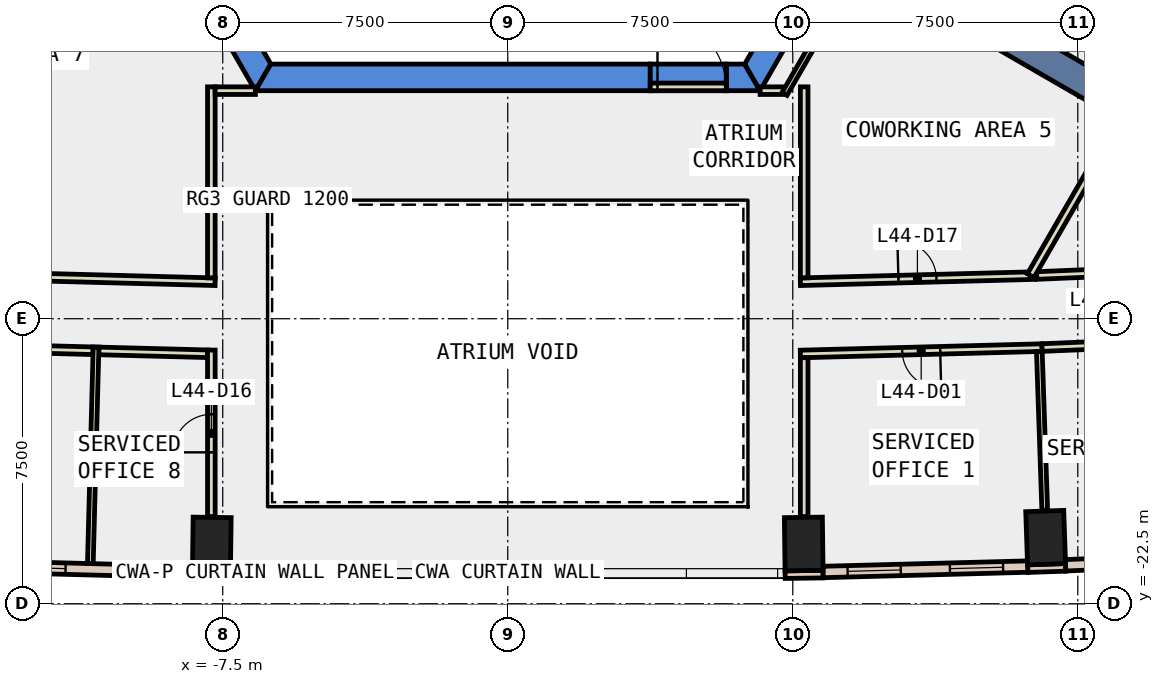
"""IFC4 building model, lengths in metres.
Left out: names, types, materials, properties, quantities, classifications, styles, units other than length and angle.
Written with IfcOpenShell. Run it as: python <this file> out.ifc"""

import sys

from ifc_helpers import new_model, si_unit, direction, frame, frame_2d, origin, origin_2d, place, context, subcontext, project, spatial, polyline, rectangle, outline, extrude, element, fill, save


model = new_model("IFC4")
c1 = context("Model", 3, precision=1e-05, world=origin(), true_north=direction((0.0, 1.0)))
c2 = subcontext(c1, "Body", "Model", "MODEL_VIEW")
j1 = project(units=[si_unit("LENGTHUNIT", "METRE"), si_unit("PLANEANGLEUNIT", "RADIAN")], contexts=[c1])
p1 = place(None, origin())
s1 = spatial("IfcSite", under=j1, at=p1, CompositionType="ELEMENT")
p2 = place(p1, origin())
s2 = spatial("IfcBuilding", under=s1, at=p2, CompositionType="ELEMENT")
p3 = place(p2, frame((0.0, 0.0, 198.2)))
s3 = spatial("IfcBuildingStorey", under=s2, at=p3, CompositionType="ELEMENT", Elevation=198.2)
for number, where, z_axis, x_axis in (
    (1, (-7.788, -20.927, -0.4), (0.0, 0.0, 1.0), (-1.0, 0.013, 0.0)),
    (2, (7.788, -20.927, -0.4), (0.0, 0.0, 1.0), (1.0, 0.013, 0.0)),
    (3, (14.154, -20.76, -0.4), (0.0, 0.0, 1.0), (0.999, 0.034, 0.0)),
):
    element("IfcColumn", number, at=place(p3, frame(where, z_axis=z_axis, x_axis=x_axis)), inside=s3, PredefinedType="COLUMN", context=c2, shape_type="SweptSolid", body=[
        extrude(rectangle(XDim=1.0, YDim=1.4, at=origin_2d()), origin(), (0.0, 0.0, 1.0), 4.2),
    ])
p4 = place(p3, frame((0.0, 0.0, -0.4)))
e4 = element("IfcWall", 4, at=p4, inside=s3, PredefinedType="SHEAR", context=c2, shape_type="SweptSolid", body=[
    extrude(outline(polyline([(-13.279, 2.5), (-6.64, -9.0), (-6.235, -8.3), (-12.471, 2.5), (-13.279, 2.5)])), origin(), (0.0, 0.0, 1.0), 4.2),
])
p5 = place(p3, frame((0.0, 0.0, -0.4)))
e5 = element("IfcWall", 5, at=p5, inside=s3, PredefinedType="SHEAR", context=c2, shape_type="SweptSolid", body=[
    extrude(outline(polyline([(3.75, -9.0), (3.75, -8.3), (-6.235, -8.3), (-6.64, -9.0), (3.75, -9.0)])), origin(), (0.0, 0.0, 1.0), 4.2),
])
p6 = place(p3, frame((0.0, 0.0, -0.4)))
e6 = element("IfcWall", 6, at=p6, inside=s3, PredefinedType="SHEAR", context=c2, shape_type="SweptSolid", body=[
    extrude(outline(polyline([(5.75, -8.3), (5.75, -9.0), (6.64, -9.0), (6.235, -8.3), (5.75, -8.3)])), origin(), (0.0, 0.0, 1.0), 4.2),
])
p7 = place(p3, frame((0.0, 0.0, 3.6)))
e7 = element("IfcWall", 7, at=p7, inside=s3, PredefinedType="SHEAR", context=c2, shape_type="SweptSolid", body=[
    extrude(outline(polyline([(5.75, -9.0), (5.75, -8.3), (3.75, -8.3), (3.75, -9.0), (5.75, -9.0)])), origin(), (0.0, 0.0, 1.0), 0.2),
])
p8 = place(p3, frame((0.0, 0.0, -0.4)))
e8 = element("IfcWall", 8, at=p8, inside=s3, PredefinedType="SHEAR", context=c2, shape_type="SweptSolid", body=[
    extrude(outline(polyline([(6.64, -9.0), (13.279, 2.5), (12.471, 2.5), (6.235, -8.3), (6.64, -9.0)])), origin(), (0.0, 0.0, 1.0), 4.2),
])
for number, where, z_axis, x_axis in (
    (9, (8.877, -5.125, -0.4), (0.0, 0.0, 1.0), (0.866, -0.5, 0.0)),
    (10, (-8.877, -5.125, -0.4), (0.0, 0.0, 1.0), (-0.866, -0.5, 0.0)),
):
    element("IfcWall", number, at=place(p3, frame(where, z_axis=z_axis, x_axis=x_axis)), inside=s3, PredefinedType="SHEAR", context=c2, shape_type="SweptSolid", body=[
        extrude(rectangle(XDim=9.0, YDim=0.8, at=frame_2d((4.5, 0.0))), origin(), (0.0, 0.0, 1.0), 4.2),
    ])
for number, where, z_axis, x_axis in (
    (11, (-8.299, -21.72, 0.0), (0.0, 0.0, 1.0), (1.0, -0.014, 0.0)),
    (12, (7.299, -21.734, 0.0), (0.0, 0.0, 1.0), (1.0, 0.014, 0.0)),
):
    element("IfcWall", number, at=place(p3, frame(where, z_axis=z_axis, x_axis=x_axis)), inside=s3, PredefinedType="STANDARD", context=c2, shape_type="SweptSolid", body=[
        extrude(rectangle(XDim=1.0, YDim=0.2, at=frame_2d((0.5, 0.0))), origin(), (0.0, 0.0, 1.0), 3.8),
    ])
p9 = place(p3, frame((13.682, -21.576, 0.0), z_axis=(0.0, 0.0, 1.0), x_axis=(0.999423561854, 0.033949138587, 0.0)))
e13 = element("IfcWall", 13, at=p9, inside=s3, PredefinedType="STANDARD", context=c2, shape_type="SweptSolid", body=[
    extrude(rectangle(XDim=1.0, YDim=0.2, at=frame_2d((0.5, 0.0))), origin(), (0.0, 0.0, 1.0), 3.8),
])
p10 = place(p3, frame((-13.681, -21.522, 0.0), z_axis=(0.0, 0.0, 1.0), x_axis=(0.999651908676, -0.026382977093, 0.0)))
e14 = element("IfcWall", 14, at=p10, inside=s3, PredefinedType="STANDARD", context=c2, shape_type="SweptSolid", body=[
    extrude(rectangle(XDim=5.386, YDim=0.3, at=frame_2d((2.693, 0.0))), origin(), (0.0, 0.0, 1.0), 3.8),
])
p11 = place(p10, frame((0.646, 0.0, 0.9)))
e15 = element("IfcOpeningElement", 15, at=p11, cuts=e14, PredefinedType="OPENING", context=c2, shape_type="SweptSolid", body=[
    extrude(rectangle(XDim=1.4, YDim=2.6, at=frame_2d((0.7, 1.3))), frame((0.0, 0.16, 0.0), z_axis=(0.0, -1.0, 0.0), x_axis=(1.0, 0.0, 0.0)), (0.0, 0.0, 1.0), 0.32),
])
p12 = place(p10, frame((3.339, 0.0, 0.9)))
e16 = element("IfcOpeningElement", 16, at=p12, cuts=e14, PredefinedType="OPENING", context=c2, shape_type="SweptSolid", body=[
    extrude(rectangle(XDim=1.4, YDim=2.6, at=frame_2d((0.7, 1.3))), frame((0.0, 0.16, 0.0), z_axis=(0.0, -1.0, 0.0), x_axis=(1.0, 0.0, 0.0)), (0.0, 0.0, 1.0), 0.32),
])
p13 = place(p3, frame((8.297, -21.664, 0.0), z_axis=(0.0, 0.0, 1.0), x_axis=(0.999651908676, 0.026382977093, 0.0)))
e17 = element("IfcWall", 17, at=p13, inside=s3, PredefinedType="STANDARD", context=c2, shape_type="SweptSolid", body=[
    extrude(rectangle(XDim=5.386, YDim=0.3, at=frame_2d((2.693, 0.0))), origin(), (0.0, 0.0, 1.0), 3.8),
])
p14 = place(p13, frame((0.646, 0.0, 0.9)))
e18 = element("IfcOpeningElement", 18, at=p14, cuts=e17, PredefinedType="OPENING", context=c2, shape_type="SweptSolid", body=[
    extrude(rectangle(XDim=1.4, YDim=2.6, at=frame_2d((0.7, 1.3))), frame((0.0, 0.16, 0.0), z_axis=(0.0, -1.0, 0.0), x_axis=(1.0, 0.0, 0.0)), (0.0, 0.0, 1.0), 0.32),
])
p15 = place(p13, frame((3.339, 0.0, 0.9)))
e19 = element("IfcOpeningElement", 19, at=p15, cuts=e17, PredefinedType="OPENING", context=c2, shape_type="SweptSolid", body=[
    extrude(rectangle(XDim=1.4, YDim=2.6, at=frame_2d((0.7, 1.3))), frame((0.0, 0.16, 0.0), z_axis=(0.0, -1.0, 0.0), x_axis=(1.0, 0.0, 0.0)), (0.0, 0.0, 1.0), 0.32),
])
p16 = place(p3, frame((14.678, -21.488, 0.0), z_axis=(0.0, 0.0, 1.0), x_axis=(0.999127941775, 0.041753514387, 0.0)))
e20 = element("IfcWall", 20, at=p16, inside=s3, PredefinedType="STANDARD", context=c2, shape_type="SweptSolid", body=[
    extrude(rectangle(XDim=5.368, YDim=0.3, at=frame_2d((2.684, 0.0))), origin(), (0.0, 0.0, 1.0), 3.8),
])
p17 = place(p16, frame((0.642, 0.0, 0.9)))
e21 = element("IfcOpeningElement", 21, at=p17, cuts=e20, PredefinedType="OPENING", context=c2, shape_type="SweptSolid", body=[
    extrude(rectangle(XDim=1.4, YDim=2.6, at=frame_2d((0.7, 1.3))), frame((0.0, 0.16, 0.0), z_axis=(0.0, -1.0, 0.0), x_axis=(1.0, 0.0, 0.0)), (0.0, 0.0, 1.0), 0.32),
])
p18 = place(p16, frame((3.326, 0.0, 0.9)))
e22 = element("IfcOpeningElement", 22, at=p18, cuts=e20, PredefinedType="OPENING", context=c2, shape_type="SweptSolid", body=[
    extrude(rectangle(XDim=1.4, YDim=2.6, at=frame_2d((0.7, 1.3))), frame((0.0, 0.16, 0.0), z_axis=(0.0, -1.0, 0.0), x_axis=(1.0, 0.0, 0.0)), (0.0, 0.0, 1.0), 0.32),
])
p19 = place(p3, frame((7.7, -14.027, 0.0), z_axis=(0.0, 0.0, 1.0), x_axis=(0.999653919353, 0.026306682088, 0.0)))
e23 = element("IfcWall", 23, at=p19, inside=s3, PredefinedType="PARTITIONING", context=c2, shape_type="SweptSolid", body=[
    extrude(rectangle(XDim=6.162, YDim=0.2, at=frame_2d((3.081, 0.0))), origin(), (0.0, 0.0, 1.0), 3.8),
])
p20 = place(p19, frame((2.581, 0.0, 0.0)))
e24 = element("IfcOpeningElement", 24, at=p20, cuts=e23, PredefinedType="OPENING", context=c2, shape_type="SweptSolid", body=[
    extrude(rectangle(XDim=1.0, YDim=2.1, at=frame_2d((0.5, 1.05))), frame((0.0, 0.11, 0.0), z_axis=(0.0, -1.0, 0.0), x_axis=(1.0, 0.0, 0.0)), (0.0, 0.0, 1.0), 0.22),
])
p21 = place(p3, frame((13.919, -13.863, 0.0), z_axis=(0.0, 0.0, 1.0), x_axis=(0.999130261307, 0.041697972867, 0.0)))
e25 = element("IfcWall", 25, at=p21, inside=s3, PredefinedType="PARTITIONING", context=c2, shape_type="SweptSolid", body=[
    extrude(rectangle(XDim=5.422, YDim=0.2, at=frame_2d((2.711, 0.0))), origin(), (0.0, 0.0, 1.0), 3.8),
])
p22 = place(p21, frame((2.211, 0.0, 0.0)))
e26 = element("IfcOpeningElement", 26, at=p22, cuts=e25, PredefinedType="OPENING", context=c2, shape_type="SweptSolid", body=[
    extrude(rectangle(XDim=1.0, YDim=2.1, at=frame_2d((0.5, 1.05))), frame((0.0, 0.11, 0.0), z_axis=(0.0, -1.0, 0.0), x_axis=(1.0, 0.0, 0.0)), (0.0, 0.0, 1.0), 0.22),
])
p23 = place(p3, frame((-13.919, -13.863, 0.0), z_axis=(0.0, 0.0, 1.0), x_axis=(0.999652206272, -0.026371698764, 0.0)))
e27 = element("IfcWall", 27, at=p23, inside=s3, PredefinedType="PARTITIONING", context=c2, shape_type="SweptSolid", body=[
    extrude(rectangle(XDim=6.221, YDim=0.2, at=frame_2d((3.111, 0.0))), origin(), (0.0, 0.0, 1.0), 3.8),
])
p24 = place(p3, frame((14.059, -15.76, 0.0), z_axis=(0.0, 0.0, 1.0), x_axis=(-0.999651338269, -0.026404580978, 0.0)))
e28 = element("IfcWall", 28, at=p24, inside=s3, PredefinedType="PARTITIONING", context=c2, shape_type="SweptSolid", body=[
    extrude(rectangle(XDim=6.361, YDim=0.2, at=frame_2d((3.181, 0.0))), origin(), (0.0, 0.0, 1.0), 3.8),
])
p25 = place(p24, frame((2.681, 0.0, 0.0)))
e29 = element("IfcOpeningElement", 29, at=p25, cuts=e28, PredefinedType="OPENING", context=c2, shape_type="SweptSolid", body=[
    extrude(rectangle(XDim=1.0, YDim=2.1, at=frame_2d((0.5, 1.05))), frame((0.0, 0.11, 0.0), z_axis=(0.0, -1.0, 0.0), x_axis=(1.0, 0.0, 0.0)), (0.0, 0.0, 1.0), 0.22),
])
p26 = place(p3, frame((19.661, -15.525, 0.0), z_axis=(0.0, 0.0, 1.0), x_axis=(-0.999127706659, -0.041759140148, 0.0)))
e30 = element("IfcWall", 30, at=p26, inside=s3, PredefinedType="PARTITIONING", context=c2, shape_type="SweptSolid", body=[
    extrude(rectangle(XDim=5.607, YDim=0.2, at=frame_2d((2.803, 0.0))), origin(), (0.0, 0.0, 1.0), 3.8),
])
p27 = place(p26, frame((2.378, 0.0, 0.0)))
e31 = element("IfcOpeningElement", 31, at=p27, cuts=e30, PredefinedType="OPENING", context=c2, shape_type="SweptSolid", body=[
    extrude(rectangle(XDim=1.0, YDim=2.1, at=frame_2d((0.5, 1.05))), frame((0.0, 0.11, 0.0), z_axis=(0.0, -1.0, 0.0), x_axis=(1.0, 0.0, 0.0)), (0.0, 0.0, 1.0), 0.22),
])
p28 = place(p3, frame((-10.912, -15.843, 0.0), z_axis=(0.0, 0.0, 1.0), x_axis=(-0.999652047394, 0.026377720532, 0.0)))
e32 = element("IfcWall", 32, at=p28, inside=s3, PredefinedType="PARTITIONING", context=c2, shape_type="SweptSolid", body=[
    extrude(rectangle(XDim=3.073, YDim=0.2, at=frame_2d((1.536, 0.0))), origin(), (0.0, 0.0, 1.0), 3.8),
])
p29 = place(p3, frame((-7.9, -15.922, 0.0), z_axis=(0.0, 0.0, 1.0), x_axis=(-0.999655039681, 0.026264075085, 0.0)))
e33 = element("IfcWall", 33, at=p29, inside=s3, PredefinedType="PARTITIONING", context=c2, shape_type="SweptSolid", body=[
    extrude(rectangle(XDim=2.863, YDim=0.2, at=frame_2d((1.432, 0.0))), origin(), (0.0, 0.0, 1.0), 3.8),
])
p30 = place(p3, frame((6.641, -8.999, 0.0), z_axis=(0.0, 0.0, 1.0), x_axis=(1.0, 0.0, 0.0)))
e34 = element("IfcWall", 34, at=p30, inside=s3, PredefinedType="PARTITIONING", context=c2, shape_type="SweptSolid", body=[
    extrude(rectangle(XDim=0.617, YDim=0.2, at=frame_2d((0.309, 0.0))), origin(), (0.0, 0.0, 1.0), 3.8),
])
p31 = place(p3, frame((7.283, -9.086, 0.0), z_axis=(0.0, 0.0, 1.0), x_axis=(0.499843936326, 0.866115488442, 0.0)))
e35 = element("IfcWall", 35, at=p31, inside=s3, PredefinedType="PARTITIONING", context=c2, shape_type="SweptSolid", body=[
    extrude(rectangle(XDim=3.827, YDim=0.15, at=frame_2d((1.914, 0.0))), origin(), (0.0, 0.0, 1.0), 3.8),
])
for number, where, z_axis, x_axis in (
    (36, (7.8, -8.899, 0.0), (0.0, 0.0, 1.0), (0.0, -1.0, 0.0)),
    (37, (-7.8, -13.924, 0.0), (0.0, 0.0, 1.0), (0.0, 1.0, 0.0)),
):
    element("IfcWall", number, at=place(p3, frame(where, z_axis=z_axis, x_axis=x_axis)), inside=s3, PredefinedType="PARTITIONING", context=c2, shape_type="SweptSolid", body=[
        extrude(rectangle(XDim=5.025, YDim=0.2, at=frame_2d((2.513, 0.0))), origin(), (0.0, 0.0, 1.0), 3.8),
    ])
p32 = place(p3, frame((-7.7, -8.999, 0.0), z_axis=(0.0, 0.0, 1.0), x_axis=(1.0, 0.0, 0.0)))
e38 = element("IfcWall", 38, at=p32, inside=s3, PredefinedType="PARTITIONING", context=c2, shape_type="SweptSolid", body=[
    extrude(rectangle(XDim=1.059, YDim=0.2, at=frame_2d((0.529, 0.0))), origin(), (0.0, 0.0, 1.0), 3.8),
])
p33 = place(p3, frame((7.8, -16.025, 0.0), z_axis=(0.0, 0.0, 1.0), x_axis=(0.0, -1.0, 0.0)))
e39 = element("IfcWall", 39, at=p33, inside=s3, PredefinedType="PARTITIONING", context=c2, shape_type="SweptSolid", body=[
    extrude(rectangle(XDim=4.182, YDim=0.2, at=frame_2d((2.091, 0.0))), origin(), (0.0, 0.0, 1.0), 3.8),
])
p34 = place(p3, frame((-7.8, -20.207, 0.0), z_axis=(0.0, 0.0, 1.0), x_axis=(0.0, 1.0, 0.0)))
e40 = element("IfcWall", 40, at=p34, inside=s3, PredefinedType="PARTITIONING", context=c2, shape_type="SweptSolid", body=[
    extrude(rectangle(XDim=4.382, YDim=0.2, at=frame_2d((2.191, 0.0))), origin(), (0.0, 0.0, 1.0), 3.8),
])
p35 = place(p34, frame((1.691, 0.0, 0.0)))
e41 = element("IfcOpeningElement", 41, at=p35, cuts=e40, PredefinedType="OPENING", context=c2, shape_type="SweptSolid", body=[
    extrude(rectangle(XDim=1.0, YDim=2.1, at=frame_2d((0.5, 1.05))), frame((0.0, 0.11, 0.0), z_axis=(0.0, -1.0, 0.0), x_axis=(1.0, 0.0, 0.0)), (0.0, 0.0, 1.0), 0.22),
])
p36 = place(p3, frame((9.853, -4.684, 0.0), z_axis=(0.0, 0.0, 1.0), x_axis=(0.865999791918, -0.500044358431, 0.0)))
e42 = element("IfcWall", 42, at=p36, inside=s3, PredefinedType="PARTITIONING", context=c2, shape_type="SweptSolid", body=[
    extrude(rectangle(XDim=8.075, YDim=0.2, at=frame_2d((4.038, 0.0))), origin(), (0.0, 0.0, 1.0), 3.8),
])
p37 = place(p3, frame((16.125, -9.771, 0.0), z_axis=(0.0, 0.0, 1.0), x_axis=(-0.500030759312, -0.866007644159, 0.0)))
e43 = element("IfcWall", 43, at=p37, inside=s3, PredefinedType="PARTITIONING", context=c2, shape_type="SweptSolid", body=[
    extrude(rectangle(XDim=4.73, YDim=0.2, at=frame_2d((2.365, 0.0))), origin(), (0.0, 0.0, 1.0), 3.8),
])
p38 = place(p3, frame((13.988, -15.862, 0.0), z_axis=(0.0, 0.0, 1.0), x_axis=(0.033931247732, -0.999424169423, 0.0)))
e44 = element("IfcWall", 44, at=p38, inside=s3, PredefinedType="PARTITIONING", context=c2, shape_type="SweptSolid", body=[
    extrude(rectangle(XDim=4.18, YDim=0.15, at=frame_2d((2.09, 0.0))), origin(), (0.0, 0.0, 1.0), 3.8),
])
p39 = place(p3, frame((-10.834, -15.745, 0.0), z_axis=(0.0, 0.0, 1.0), x_axis=(-0.026298797458, -0.999654126812, 0.0)))
e45 = element("IfcWall", 45, at=p39, inside=s3, PredefinedType="PARTITIONING", context=c2, shape_type="SweptSolid", body=[
    extrude(rectangle(XDim=5.7, YDim=0.15, at=frame_2d((2.85, 0.0))), origin(), (0.0, 0.0, 1.0), 3.8),
])
p40 = place(p3, frame((3.75, -8.9, 0.0), z_axis=(0.0, 0.0, 1.0), x_axis=(1.0, 0.0, 0.0)))
e46 = element("IfcWall", 46, at=p40, inside=s3, PredefinedType="PARTITIONING", context=c2, shape_type="SweptSolid", body=[
    extrude(rectangle(XDim=2.0, YDim=0.2, at=frame_2d((1.0, 0.0))), origin(), (0.0, 0.0, 1.0), 2.4),
])
p41 = place(p40, frame((0.19, 0.0, 0.0)))
e47 = element("IfcOpeningElement", 47, at=p41, cuts=e46, PredefinedType="OPENING", context=c2, shape_type="SweptSolid", body=[
    extrude(rectangle(XDim=1.8, YDim=2.1, at=frame_2d((0.9, 1.05))), frame((0.0, 0.11, 0.0), z_axis=(0.0, -1.0, 0.0), x_axis=(1.0, 0.0, 0.0)), (0.0, 0.0, 1.0), 0.22),
])
p42 = place(p11, origin())
e48 = element("IfcWindow", 48, at=p42, inside=s3, PartitioningType="SINGLE_PANEL", PredefinedType="WINDOW", context=c2, shape_type="SweptSolid", body=[
    extrude(rectangle(XDim=1.4, YDim=2.6, at=frame_2d((0.7, 1.3))), frame((0.0, 0.03, 0.0), z_axis=(0.0, -1.0, 0.0), x_axis=(1.0, 0.0, 0.0)), (0.0, 0.0, 1.0), 0.06),
])
fill(e15, e48)
p43 = place(p12, origin())
e49 = element("IfcWindow", 49, at=p43, inside=s3, PartitioningType="SINGLE_PANEL", PredefinedType="WINDOW", context=c2, shape_type="SweptSolid", body=[
    extrude(rectangle(XDim=1.4, YDim=2.6, at=frame_2d((0.7, 1.3))), frame((0.0, 0.03, 0.0), z_axis=(0.0, -1.0, 0.0), x_axis=(1.0, 0.0, 0.0)), (0.0, 0.0, 1.0), 0.06),
])
fill(e16, e49)
p44 = place(p14, origin())
e50 = element("IfcWindow", 50, at=p44, inside=s3, PartitioningType="SINGLE_PANEL", PredefinedType="WINDOW", context=c2, shape_type="SweptSolid", body=[
    extrude(rectangle(XDim=1.4, YDim=2.6, at=frame_2d((0.7, 1.3))), frame((0.0, 0.03, 0.0), z_axis=(0.0, -1.0, 0.0), x_axis=(1.0, 0.0, 0.0)), (0.0, 0.0, 1.0), 0.06),
])
fill(e18, e50)
p45 = place(p15, origin())
e51 = element("IfcWindow", 51, at=p45, inside=s3, PartitioningType="SINGLE_PANEL", PredefinedType="WINDOW", context=c2, shape_type="SweptSolid", body=[
    extrude(rectangle(XDim=1.4, YDim=2.6, at=frame_2d((0.7, 1.3))), frame((0.0, 0.03, 0.0), z_axis=(0.0, -1.0, 0.0), x_axis=(1.0, 0.0, 0.0)), (0.0, 0.0, 1.0), 0.06),
])
fill(e19, e51)
p46 = place(p25, origin())
e52 = element("IfcDoor", 52, at=p46, inside=s3, OperationType="SINGLE_SWING_LEFT", PredefinedType="DOOR", context=c2, shape_type="SweptSolid", body=[
    extrude(rectangle(XDim=1.0, YDim=2.1, at=frame_2d((0.5, 1.05))), frame((0.0, 0.025, 0.0), z_axis=(0.0, -1.0, 0.0), x_axis=(1.0, 0.0, 0.0)), (0.0, 0.0, 1.0), 0.05),
])
fill(e29, e52)
p47 = place(p35, origin())
e53 = element("IfcDoor", 53, at=p47, inside=s3, OperationType="SINGLE_SWING_LEFT", PredefinedType="DOOR", context=c2, shape_type="SweptSolid", body=[
    extrude(rectangle(XDim=1.0, YDim=2.1, at=frame_2d((0.5, 1.05))), frame((0.0, 0.025, 0.0), z_axis=(0.0, -1.0, 0.0), x_axis=(1.0, 0.0, 0.0)), (0.0, 0.0, 1.0), 0.05),
])
fill(e41, e53)
p48 = place(p20, origin())
e54 = element("IfcDoor", 54, at=p48, inside=s3, OperationType="SINGLE_SWING_LEFT", PredefinedType="DOOR", context=c2, shape_type="SweptSolid", body=[
    extrude(rectangle(XDim=1.0, YDim=2.1, at=frame_2d((0.5, 1.05))), frame((0.0, 0.025, 0.0), z_axis=(0.0, -1.0, 0.0), x_axis=(1.0, 0.0, 0.0)), (0.0, 0.0, 1.0), 0.05),
])
fill(e24, e54)
p49 = place(p41, origin())
e55 = element("IfcDoor", 55, at=p49, inside=s3, OperationType="DOUBLE_DOOR_SINGLE_SWING", PredefinedType="DOOR", context=c2, shape_type="SweptSolid", body=[
    extrude(rectangle(XDim=1.8, YDim=2.1, at=frame_2d((0.9, 1.05))), frame((0.0, 0.025, 0.0), z_axis=(0.0, -1.0, 0.0), x_axis=(1.0, 0.0, 0.0)), (0.0, 0.0, 1.0), 0.05),
])
fill(e47, e55)
save(model, sys.argv[1])
